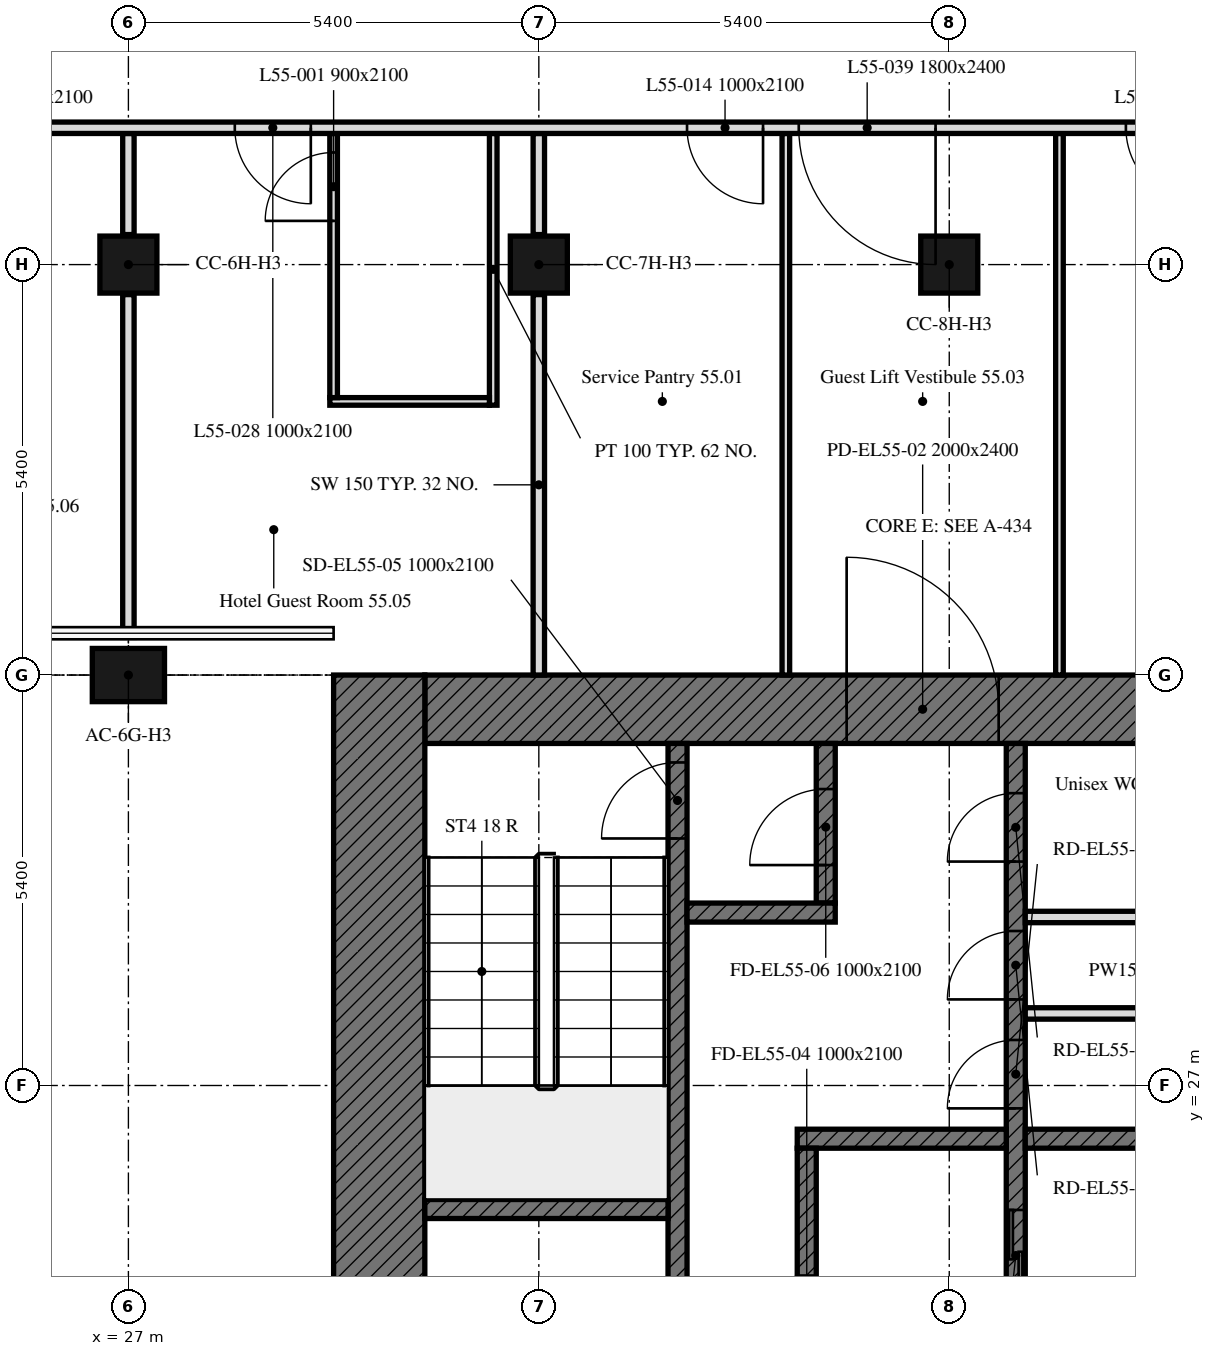
"""IFC4 building model, lengths in metres.
Left out: names, types, materials, properties, quantities, classifications, styles, units other than length and angle.
Written with IfcOpenShell. Run it as: python <this file> out.ifc"""

import sys

from ifc_helpers import new_model, si_unit, direction, frame, frame_2d, origin, origin_2d, place, context, subcontext, project, spatial, rectangle, extrude, element, fill, save


model = new_model("IFC4")
c1 = context("Model", 3, precision=1e-05, world=origin(), true_north=direction((0.0, 1.0)))
c2 = subcontext(c1, "Body", "Model", "MODEL_VIEW")
j1 = project(units=[si_unit("LENGTHUNIT", "METRE"), si_unit("PLANEANGLEUNIT", "RADIAN")], contexts=[c1])
p1 = place(None, origin())
s1 = spatial("IfcSite", under=j1, at=p1, CompositionType="ELEMENT")
p2 = place(p1, origin())
s2 = spatial("IfcBuilding", under=s1, at=p2, CompositionType="ELEMENT")
p3 = place(p2, frame((0.0, 0.0, 220.3)))
s3 = spatial("IfcBuildingStorey", under=s2, at=p3, CompositionType="ELEMENT", Elevation=220.3)
p4 = place(p3, frame((27.0, 32.4, 0.0), z_axis=(0.0, 0.0, 1.0), x_axis=(1.0, 0.0, 0.0)))
e1 = element("IfcColumn", 1, at=p4, inside=s3, PredefinedType="COLUMN", context=c2, shape_type="SweptSolid", body=[
    extrude(rectangle(XDim=0.95, YDim=0.7, at=origin_2d()), origin(), (0.0, 0.0, 1.0), 3.0),
])
for number, where, z_axis, x_axis in (
    (2, (27.0, 37.8, 0.0), (0.0, 0.0, 1.0), (1.0, 0.0, 0.0)),
    (3, (32.4, 37.8, 0.0), (0.0, 0.0, 1.0), (1.0, 0.0, 0.0)),
    (4, (37.8, 37.8, 0.0), (0.0, 0.0, 1.0), (1.0, 0.0, 0.0)),
):
    element("IfcColumn", number, at=place(p3, frame(where, z_axis=z_axis, x_axis=x_axis)), inside=s3, PredefinedType="COLUMN", context=c2, shape_type="SweptSolid", body=[
        extrude(rectangle(XDim=0.75, YDim=0.75, at=origin_2d()), origin(), (0.0, 0.0, 1.0), 3.0),
    ])
p5 = place(p3, frame((30.9, 31.95, 0.0), z_axis=(0.0, 0.0, 1.0), x_axis=(1.0, 0.0, 0.0)))
e5 = element("IfcWall", 5, at=p5, inside=s3, PredefinedType="SOLIDWALL", context=c2, shape_type="SweptSolid", body=[
    extrude(rectangle(XDim=11.1, YDim=0.9, at=frame_2d((5.55, 0.0))), origin(), (0.0, 0.0, 1.0), 3.0),
])
p6 = place(p5, frame((5.55, 0.0, 0.0)))
e6 = element("IfcOpeningElement", 6, at=p6, cuts=e5, PredefinedType="OPENING", context=c2, shape_type="SweptSolid", body=[
    extrude(rectangle(XDim=2.0, YDim=2.4, at=frame_2d((1.0, 1.2))), frame((0.0, 0.45, 0.0), z_axis=(0.0, -1.0, 0.0), x_axis=(1.0, 0.0, 0.0)), (0.0, 0.0, 1.0), 0.9),
])
p7 = place(p3, frame((30.3, 16.2, 0.0), z_axis=(0.0, 0.0, 1.0), x_axis=(0.0, 1.0, 0.0)))
e7 = element("IfcWall", 7, at=p7, inside=s3, PredefinedType="SOLIDWALL", context=c2, shape_type="SweptSolid", body=[
    extrude(rectangle(XDim=16.2, YDim=1.2, at=frame_2d((8.1, 0.0))), origin(), (0.0, 0.0, 1.0), 3.0),
])
p8 = place(p3, frame((38.675, 17.1, 0.0), z_axis=(0.0, 0.0, 1.0), x_axis=(0.0, 1.0, 0.0)))
e8 = element("IfcWall", 8, at=p8, inside=s3, PredefinedType="SOLIDWALL", context=c2, shape_type="SweptSolid", body=[
    extrude(rectangle(XDim=14.4, YDim=0.25, at=frame_2d((7.2, 0.0))), origin(), (0.0, 0.0, 1.0), 3.0),
])
p9 = place(p8, frame((4.6, 0.0, 0.0)))
e9 = element("IfcOpeningElement", 9, at=p9, cuts=e8, PredefinedType="OPENING", context=c2, shape_type="SweptSolid", body=[
    extrude(rectangle(XDim=1.0, YDim=2.1, at=frame_2d((0.5, 1.05))), frame((0.0, 0.125, 0.0), z_axis=(0.0, -1.0, 0.0), x_axis=(1.0, 0.0, 0.0)), (0.0, 0.0, 1.0), 0.25),
])
p10 = place(p8, frame((7.062, 0.0, 0.0)))
e10 = element("IfcOpeningElement", 10, at=p10, cuts=e8, PredefinedType="OPENING", context=c2, shape_type="SweptSolid", body=[
    extrude(rectangle(XDim=1.2, YDim=2.1, at=frame_2d((0.6, 1.05))), frame((0.0, 0.125, 0.0), z_axis=(0.0, -1.0, 0.0), x_axis=(1.0, 0.0, 0.0)), (0.0, 0.0, 1.0), 0.25),
])
p11 = place(p8, frame((9.599, 0.0, 0.0)))
e11 = element("IfcOpeningElement", 11, at=p11, cuts=e8, PredefinedType="OPENING", context=c2, shape_type="SweptSolid", body=[
    extrude(rectangle(XDim=0.9, YDim=2.1, at=frame_2d((0.45, 1.05))), frame((0.0, 0.125, 0.0), z_axis=(0.0, -1.0, 0.0), x_axis=(1.0, 0.0, 0.0)), (0.0, 0.0, 1.0), 0.25),
])
p12 = place(p8, frame((11.032, 0.0, 0.0)))
e12 = element("IfcOpeningElement", 12, at=p12, cuts=e8, PredefinedType="OPENING", context=c2, shape_type="SweptSolid", body=[
    extrude(rectangle(XDim=0.9, YDim=2.1, at=frame_2d((0.45, 1.05))), frame((0.0, 0.125, 0.0), z_axis=(0.0, -1.0, 0.0), x_axis=(1.0, 0.0, 0.0)), (0.0, 0.0, 1.0), 0.25),
])
p13 = place(p8, frame((12.846, 0.0, 0.0)))
e13 = element("IfcOpeningElement", 13, at=p13, cuts=e8, PredefinedType="OPENING", context=c2, shape_type="SweptSolid", body=[
    extrude(rectangle(XDim=0.9, YDim=2.1, at=frame_2d((0.45, 1.05))), frame((0.0, 0.125, 0.0), z_axis=(0.0, -1.0, 0.0), x_axis=(1.0, 0.0, 0.0)), (0.0, 0.0, 1.0), 0.25),
])
p14 = place(p3, frame((34.225, 17.1, 0.0), z_axis=(0.0, 0.0, 1.0), x_axis=(0.0, 1.0, 0.0)))
e14 = element("IfcWall", 14, at=p14, inside=s3, PredefinedType="SOLIDWALL", context=c2, shape_type="SweptSolid", body=[
    extrude(rectangle(XDim=14.4, YDim=0.25, at=frame_2d((7.2, 0.0))), origin(), (0.0, 0.0, 1.0), 3.0),
])
p15 = place(p14, frame((13.15, 0.0, 0.0)))
e15 = element("IfcOpeningElement", 15, at=p15, cuts=e14, PredefinedType="OPENING", context=c2, shape_type="SweptSolid", body=[
    extrude(rectangle(XDim=1.0, YDim=2.1, at=frame_2d((0.5, 1.05))), frame((0.0, 0.125, 0.0), z_axis=(0.0, -1.0, 0.0), x_axis=(1.0, 0.0, 0.0)), (0.0, 0.0, 1.0), 0.25),
])
p16 = place(p14, frame((0.6, 0.0, 0.0)))
e16 = element("IfcOpeningElement", 16, at=p16, cuts=e14, PredefinedType="OPENING", context=c2, shape_type="SweptSolid", body=[
    extrude(rectangle(XDim=1.1, YDim=2.1, at=frame_2d((0.55, 1.05))), frame((0.0, 0.125, 0.0), z_axis=(0.0, -1.0, 0.0), x_axis=(1.0, 0.0, 0.0)), (0.0, 0.0, 1.0), 0.25),
])
p17 = place(p14, frame((3.25, 0.0, 0.0)))
e17 = element("IfcOpeningElement", 17, at=p17, cuts=e14, PredefinedType="OPENING", context=c2, shape_type="SweptSolid", body=[
    extrude(rectangle(XDim=0.9, YDim=2.1, at=frame_2d((0.45, 1.05))), frame((0.0, 0.125, 0.0), z_axis=(0.0, -1.0, 0.0), x_axis=(1.0, 0.0, 0.0)), (0.0, 0.0, 1.0), 0.25),
])
p18 = place(p3, frame((30.9, 25.375, 0.0), z_axis=(0.0, 0.0, 1.0), x_axis=(1.0, 0.0, 0.0)))
e18 = element("IfcWall", 18, at=p18, inside=s3, PredefinedType="SOLIDWALL", context=c2, shape_type="SweptSolid", body=[
    extrude(rectangle(XDim=3.2, YDim=0.25, at=frame_2d((1.6, 0.0))), origin(), (0.0, 0.0, 1.0), 3.0),
])
p19 = place(p3, frame((38.8, 26.3, 0.0), z_axis=(0.0, 0.0, 1.0), x_axis=(1.0, 0.0, 0.0)))
e19 = element("IfcWall", 19, at=p19, inside=s3, PredefinedType="SOLIDWALL", context=c2, shape_type="SweptSolid", body=[
    extrude(rectangle(XDim=3.2, YDim=0.25, at=frame_2d((1.6, 0.0))), origin(), (0.0, 0.0, 1.0), 3.0),
])
p20 = place(p3, frame((35.8, 26.3, 0.0), z_axis=(0.0, 0.0, 1.0), x_axis=(1.0, 0.0, 0.0)))
e20 = element("IfcWall", 20, at=p20, inside=s3, PredefinedType="SOLIDWALL", context=c2, shape_type="SweptSolid", body=[
    extrude(rectangle(XDim=2.75, YDim=0.25, at=frame_2d((1.375, 0.0))), origin(), (0.0, 0.0, 1.0), 3.0),
])
p21 = place(p3, frame((36.175, 29.4, 0.0), z_axis=(0.0, 0.0, 1.0), x_axis=(0.0, 1.0, 0.0)))
e21 = element("IfcWall", 21, at=p21, inside=s3, PredefinedType="SOLIDWALL", context=c2, shape_type="SweptSolid", body=[
    extrude(rectangle(XDim=2.1, YDim=0.25, at=frame_2d((1.05, 0.0))), origin(), (0.0, 0.0, 1.0), 3.0),
])
p22 = place(p21, frame((0.5, 0.0, 0.0)))
e22 = element("IfcOpeningElement", 22, at=p22, cuts=e21, PredefinedType="OPENING", context=c2, shape_type="SweptSolid", body=[
    extrude(rectangle(XDim=1.0, YDim=2.1, at=frame_2d((0.5, 1.05))), frame((0.0, 0.125, 0.0), z_axis=(0.0, -1.0, 0.0), x_axis=(1.0, 0.0, 0.0)), (0.0, 0.0, 1.0), 0.25),
])
p23 = place(p3, frame((34.35, 29.275, 0.0), z_axis=(0.0, 0.0, 1.0), x_axis=(1.0, 0.0, 0.0)))
e23 = element("IfcWall", 23, at=p23, inside=s3, PredefinedType="SOLIDWALL", context=c2, shape_type="SweptSolid", body=[
    extrude(rectangle(XDim=1.95, YDim=0.25, at=frame_2d((0.975, 0.0))), origin(), (0.0, 0.0, 1.0), 3.0),
])
p24 = place(p3, frame((35.925, 20.55, 0.0), z_axis=(0.0, 0.0, 1.0), x_axis=(0.0, 1.0, 0.0)))
e24 = element("IfcWall", 24, at=p24, inside=s3, PredefinedType="SOLIDWALL", context=c2, shape_type="SweptSolid", body=[
    extrude(rectangle(XDim=5.625, YDim=0.25, at=frame_2d((2.812, 0.0))), origin(), (0.0, 0.0, 1.0), 3.0),
])
p25 = place(p24, frame((2.95, 0.0, 0.0)))
e25 = element("IfcOpeningElement", 25, at=p25, cuts=e24, PredefinedType="OPENING", context=c2, shape_type="SweptSolid", body=[
    extrude(rectangle(XDim=1.0, YDim=2.1, at=frame_2d((0.5, 1.05))), frame((0.0, 0.125, 0.0), z_axis=(0.0, -1.0, 0.0), x_axis=(1.0, 0.0, 0.0)), (0.0, 0.0, 1.0), 0.25),
])
for number, where, z_axis, x_axis in (
    (26, (38.8, 27.948, 0.0), (0.0, 0.0, 1.0), (1.0, 0.0, 0.0)),
    (27, (38.8, 29.217, 0.0), (0.0, 0.0, 1.0), (1.0, 0.0, 0.0)),
):
    element("IfcWall", number, at=place(p3, frame(where, z_axis=z_axis, x_axis=x_axis)), inside=s3, PredefinedType="PARTITIONING", context=c2, shape_type="SweptSolid", body=[
        extrude(rectangle(XDim=3.2, YDim=0.15, at=frame_2d((1.6, 0.0))), origin(), (0.0, 0.0, 1.0), 3.0),
    ])
p26 = place(p3, frame((32.4, 32.4, 0.0), z_axis=(0.0, 0.0, 1.0), x_axis=(0.0, 1.0, 0.0)))
e28 = element("IfcWall", 28, at=p26, inside=s3, PredefinedType="PARTITIONING", context=c2, shape_type="SweptSolid", body=[
    extrude(rectangle(XDim=5.005, YDim=0.15, at=frame_2d((2.502, 0.0))), origin(), (0.0, 0.0, 1.0), 2.4),
])
p27 = place(p3, frame((32.4, 38.195, 0.0), z_axis=(0.0, 0.0, 1.0), x_axis=(0.0, 1.0, 0.0)))
e29 = element("IfcWall", 29, at=p27, inside=s3, PredefinedType="PARTITIONING", context=c2, shape_type="SweptSolid", body=[
    extrude(rectangle(XDim=1.33, YDim=0.15, at=frame_2d((0.665, 0.0))), origin(), (0.0, 0.0, 1.0), 2.4),
])
p28 = place(p3, frame((31.8, 39.525, 0.0), z_axis=(0.0, 0.0, 1.0), x_axis=(0.0, -1.0, 0.0)))
e30 = element("IfcWall", 30, at=p28, inside=s3, PredefinedType="PARTITIONING", context=c2, shape_type="SweptSolid", body=[
    extrude(rectangle(XDim=3.575, YDim=0.1, at=frame_2d((1.788, 0.0))), origin(), (0.0, 0.0, 1.0), 3.0),
])
p29 = place(p3, frame((31.75, 36.0, 0.0), z_axis=(0.0, 0.0, 1.0), x_axis=(-1.0, 0.0, 0.0)))
e31 = element("IfcWall", 31, at=p29, inside=s3, PredefinedType="PARTITIONING", context=c2, shape_type="SweptSolid", body=[
    extrude(rectangle(XDim=2.1, YDim=0.1, at=frame_2d((1.05, 0.0))), origin(), (0.0, 0.0, 1.0), 3.0),
])
p30 = place(p3, frame((29.7, 36.05, 0.0), z_axis=(0.0, 0.0, 1.0), x_axis=(0.0, 1.0, 0.0)))
e32 = element("IfcWall", 32, at=p30, inside=s3, PredefinedType="PARTITIONING", context=c2, shape_type="SweptSolid", body=[
    extrude(rectangle(XDim=3.475, YDim=0.1, at=frame_2d((1.737, 0.0))), origin(), (0.0, 0.0, 1.0), 3.0),
])
p31 = place(p30, frame((2.325, 0.0, 0.0)))
e33 = element("IfcOpeningElement", 33, at=p31, cuts=e32, PredefinedType="OPENING", context=c2, shape_type="SweptSolid", body=[
    extrude(rectangle(XDim=0.9, YDim=2.1, at=frame_2d((0.45, 1.05))), frame((0.0, 0.05, 0.0), z_axis=(0.0, -1.0, 0.0), x_axis=(1.0, 0.0, 0.0)), (0.0, 0.0, 1.0), 0.1),
])
p32 = place(p3, frame((27.0, 39.525, 0.0), z_axis=(0.0, 0.0, 1.0), x_axis=(0.0, -1.0, 0.0)))
e34 = element("IfcWall", 34, at=p32, inside=s3, PredefinedType="PARTITIONING", context=c2, shape_type="SweptSolid", body=[
    extrude(rectangle(XDim=1.33, YDim=0.15, at=frame_2d((0.665, 0.0))), origin(), (0.0, 0.0, 1.0), 2.4),
])
p33 = place(p3, frame((27.0, 37.405, 0.0), z_axis=(0.0, 0.0, 1.0), x_axis=(0.0, -1.0, 0.0)))
e35 = element("IfcWall", 35, at=p33, inside=s3, PredefinedType="PARTITIONING", context=c2, shape_type="SweptSolid", body=[
    extrude(rectangle(XDim=4.51, YDim=0.15, at=frame_2d((2.255, 0.0))), origin(), (0.0, 0.0, 1.0), 2.4),
])
for number, where, z_axis, x_axis in (
    (36, (39.25, 32.4, 0.0), (0.0, 0.0, 1.0), (0.0, 1.0, 0.0)),
    (37, (35.65, 39.525, 0.0), (0.0, 0.0, 1.0), (0.0, -1.0, 0.0)),
):
    element("IfcWall", number, at=place(p3, frame(where, z_axis=z_axis, x_axis=x_axis)), inside=s3, PredefinedType="PARTITIONING", context=c2, shape_type="SweptSolid", body=[
        extrude(rectangle(XDim=7.125, YDim=0.1, at=frame_2d((3.562, 0.0))), origin(), (0.0, 0.0, 1.0), 3.0),
    ])
p34 = place(p3, frame((41.374, 39.6, 0.0), z_axis=(0.0, 0.0, 1.0), x_axis=(-1.0, 0.0, 0.0)))
e38 = element("IfcWall", 38, at=p34, inside=s3, PredefinedType="PARTITIONING", context=c2, shape_type="SweptSolid", body=[
    extrude(rectangle(XDim=35.899, YDim=0.15, at=frame_2d((17.949, 0.0))), origin(), (0.0, 0.0, 1.0), 2.4),
])
p35 = place(p34, frame((0.25, 0.0, 0.0)))
e39 = element("IfcOpeningElement", 39, at=p35, cuts=e38, PredefinedType="OPENING", context=c2, shape_type="SweptSolid", body=[
    extrude(rectangle(XDim=1.0, YDim=2.1, at=frame_2d((0.5, 1.05))), frame((0.0, 0.075, 0.0), z_axis=(0.0, -1.0, 0.0), x_axis=(1.0, 0.0, 0.0)), (0.0, 0.0, 1.0), 0.15),
])
p36 = place(p34, frame((27.124, 0.0, 0.0)))
e40 = element("IfcOpeningElement", 40, at=p36, cuts=e38, PredefinedType="OPENING", context=c2, shape_type="SweptSolid", body=[
    extrude(rectangle(XDim=1.0, YDim=2.1, at=frame_2d((0.5, 1.05))), frame((0.0, 0.075, 0.0), z_axis=(0.0, -1.0, 0.0), x_axis=(1.0, 0.0, 0.0)), (0.0, 0.0, 1.0), 0.15),
])
p37 = place(p34, frame((6.024, 0.0, 0.0)))
e41 = element("IfcOpeningElement", 41, at=p37, cuts=e38, PredefinedType="OPENING", context=c2, shape_type="SweptSolid", body=[
    extrude(rectangle(XDim=1.0, YDim=2.1, at=frame_2d((0.5, 1.05))), frame((0.0, 0.075, 0.0), z_axis=(0.0, -1.0, 0.0), x_axis=(1.0, 0.0, 0.0)), (0.0, 0.0, 1.0), 0.15),
])
p38 = place(p34, frame((11.974, 0.0, 0.0)))
e42 = element("IfcOpeningElement", 42, at=p38, cuts=e38, PredefinedType="OPENING", context=c2, shape_type="SweptSolid", body=[
    extrude(rectangle(XDim=1.0, YDim=2.1, at=frame_2d((0.5, 1.05))), frame((0.0, 0.075, 0.0), z_axis=(0.0, -1.0, 0.0), x_axis=(1.0, 0.0, 0.0)), (0.0, 0.0, 1.0), 0.15),
])
p39 = place(p34, frame((15.774, 0.0, 0.0)))
e43 = element("IfcOpeningElement", 43, at=p39, cuts=e38, PredefinedType="OPENING", context=c2, shape_type="SweptSolid", body=[
    extrude(rectangle(XDim=1.0, YDim=2.1, at=frame_2d((0.5, 1.05))), frame((0.0, 0.075, 0.0), z_axis=(0.0, -1.0, 0.0), x_axis=(1.0, 0.0, 0.0)), (0.0, 0.0, 1.0), 0.15),
])
p40 = place(p34, frame((22.774, 0.0, 0.0)))
e44 = element("IfcOpeningElement", 44, at=p40, cuts=e38, PredefinedType="OPENING", context=c2, shape_type="SweptSolid", body=[
    extrude(rectangle(XDim=1.0, YDim=2.1, at=frame_2d((0.5, 1.05))), frame((0.0, 0.075, 0.0), z_axis=(0.0, -1.0, 0.0), x_axis=(1.0, 0.0, 0.0)), (0.0, 0.0, 1.0), 0.15),
])
p41 = place(p34, frame((3.754, 0.0, 0.0)))
e45 = element("IfcOpeningElement", 45, at=p41, cuts=e38, PredefinedType="OPENING", context=c2, shape_type="SweptSolid", body=[
    extrude(rectangle(XDim=1.8, YDim=2.4, at=frame_2d((0.9, 1.2))), frame((0.0, 0.075, 0.0), z_axis=(0.0, -1.0, 0.0), x_axis=(1.0, 0.0, 0.0)), (0.0, 0.0, 1.0), 0.15),
])
p42 = place(p34, frame((29.124, 0.0, 0.0)))
e46 = element("IfcOpeningElement", 46, at=p42, cuts=e38, PredefinedType="OPENING", context=c2, shape_type="SweptSolid", body=[
    extrude(rectangle(XDim=1.0, YDim=2.1, at=frame_2d((0.5, 1.05))), frame((0.0, 0.075, 0.0), z_axis=(0.0, -1.0, 0.0), x_axis=(1.0, 0.0, 0.0)), (0.0, 0.0, 1.0), 0.15),
])
p43 = place(p6, origin())
e47 = element("IfcDoor", 47, at=p43, inside=s3, OperationType="DOUBLE_DOOR_SINGLE_SWING", PredefinedType="DOOR", context=c2, shape_type="SweptSolid", body=[
    extrude(rectangle(XDim=2.0, YDim=2.4, at=frame_2d((1.0, 1.2))), frame((0.0, 0.025, 0.0), z_axis=(0.0, -1.0, 0.0), x_axis=(1.0, 0.0, 0.0)), (0.0, 0.0, 1.0), 0.05),
])
fill(e6, e47)
p44 = place(p15, origin())
e48 = element("IfcDoor", 48, at=p44, inside=s3, OperationType="SINGLE_SWING_LEFT", PredefinedType="DOOR", context=c2, shape_type="SweptSolid", body=[
    extrude(rectangle(XDim=1.0, YDim=2.1, at=frame_2d((0.5, 1.05))), frame((0.0, 0.025, 0.0), z_axis=(0.0, -1.0, 0.0), x_axis=(1.0, 0.0, 0.0)), (0.0, 0.0, 1.0), 0.05),
])
fill(e15, e48)
p45 = place(p22, origin())
e49 = element("IfcDoor", 49, at=p45, inside=s3, OperationType="SINGLE_SWING_LEFT", PredefinedType="DOOR", context=c2, shape_type="SweptSolid", body=[
    extrude(rectangle(XDim=1.0, YDim=2.1, at=frame_2d((0.5, 1.05))), frame((0.0, 0.025, 0.0), z_axis=(0.0, -1.0, 0.0), x_axis=(1.0, 0.0, 0.0)), (0.0, 0.0, 1.0), 0.05),
])
fill(e22, e49)
p46 = place(p10, origin())
e50 = element("IfcDoor", 50, at=p46, inside=s3, OperationType="DOUBLE_DOOR_SLIDING", PredefinedType="DOOR", context=c2, shape_type="SweptSolid", body=[
    extrude(rectangle(XDim=1.2, YDim=2.1, at=frame_2d((0.6, 1.05))), frame((0.0, 0.025, 0.0), z_axis=(0.0, -1.0, 0.0), x_axis=(1.0, 0.0, 0.0)), (0.0, 0.0, 1.0), 0.05),
])
fill(e10, e50)
p47 = place(p11, origin())
e51 = element("IfcDoor", 51, at=p47, inside=s3, OperationType="SINGLE_SWING_LEFT", PredefinedType="DOOR", context=c2, shape_type="SweptSolid", body=[
    extrude(rectangle(XDim=0.9, YDim=2.1, at=frame_2d((0.45, 1.05))), frame((0.0, 0.025, 0.0), z_axis=(0.0, -1.0, 0.0), x_axis=(1.0, 0.0, 0.0)), (0.0, 0.0, 1.0), 0.05),
])
fill(e11, e51)
p48 = place(p12, origin())
e52 = element("IfcDoor", 52, at=p48, inside=s3, OperationType="SINGLE_SWING_LEFT", PredefinedType="DOOR", context=c2, shape_type="SweptSolid", body=[
    extrude(rectangle(XDim=0.9, YDim=2.1, at=frame_2d((0.45, 1.05))), frame((0.0, 0.025, 0.0), z_axis=(0.0, -1.0, 0.0), x_axis=(1.0, 0.0, 0.0)), (0.0, 0.0, 1.0), 0.05),
])
fill(e12, e52)
p49 = place(p13, origin())
e53 = element("IfcDoor", 53, at=p49, inside=s3, OperationType="SINGLE_SWING_LEFT", PredefinedType="DOOR", context=c2, shape_type="SweptSolid", body=[
    extrude(rectangle(XDim=0.9, YDim=2.1, at=frame_2d((0.45, 1.05))), frame((0.0, 0.025, 0.0), z_axis=(0.0, -1.0, 0.0), x_axis=(1.0, 0.0, 0.0)), (0.0, 0.0, 1.0), 0.05),
])
fill(e13, e53)
p50 = place(p31, origin())
e54 = element("IfcDoor", 54, at=p50, inside=s3, OperationType="SINGLE_SWING_LEFT", PredefinedType="DOOR", context=c2, shape_type="SweptSolid", body=[
    extrude(rectangle(XDim=0.9, YDim=2.1, at=frame_2d((0.45, 1.05))), frame((0.0, 0.025, 0.0), z_axis=(0.0, -1.0, 0.0), x_axis=(1.0, 0.0, 0.0)), (0.0, 0.0, 1.0), 0.05),
])
fill(e33, e54)
p51 = place(p35, origin())
e55 = element("IfcDoor", 55, at=p51, inside=s3, OperationType="SINGLE_SWING_LEFT", PredefinedType="DOOR", context=c2, shape_type="SweptSolid", body=[
    extrude(rectangle(XDim=1.0, YDim=2.1, at=frame_2d((0.5, 1.05))), frame((0.0, 0.025, 0.0), z_axis=(0.0, -1.0, 0.0), x_axis=(1.0, 0.0, 0.0)), (0.0, 0.0, 1.0), 0.05),
])
fill(e39, e55)
p52 = place(p37, origin())
e56 = element("IfcDoor", 56, at=p52, inside=s3, OperationType="SINGLE_SWING_RIGHT", PredefinedType="DOOR", context=c2, shape_type="SweptSolid", body=[
    extrude(rectangle(XDim=1.0, YDim=2.1, at=frame_2d((0.5, 1.05))), frame((0.0, 0.025, 0.0), z_axis=(0.0, -1.0, 0.0), x_axis=(1.0, 0.0, 0.0)), (0.0, 0.0, 1.0), 0.05),
])
fill(e41, e56)
p53 = place(p38, origin())
e57 = element("IfcDoor", 57, at=p53, inside=s3, OperationType="SINGLE_SWING_LEFT", PredefinedType="DOOR", context=c2, shape_type="SweptSolid", body=[
    extrude(rectangle(XDim=1.0, YDim=2.1, at=frame_2d((0.5, 1.05))), frame((0.0, 0.025, 0.0), z_axis=(0.0, -1.0, 0.0), x_axis=(1.0, 0.0, 0.0)), (0.0, 0.0, 1.0), 0.05),
])
fill(e42, e57)
p54 = place(p41, origin())
e58 = element("IfcDoor", 58, at=p54, inside=s3, OperationType="DOUBLE_DOOR_SINGLE_SWING", PredefinedType="DOOR", context=c2, shape_type="SweptSolid", body=[
    extrude(rectangle(XDim=1.8, YDim=2.4, at=frame_2d((0.9, 1.2))), frame((0.0, 0.025, 0.0), z_axis=(0.0, -1.0, 0.0), x_axis=(1.0, 0.0, 0.0)), (0.0, 0.0, 1.0), 0.05),
])
fill(e45, e58)
save(model, sys.argv[1])
